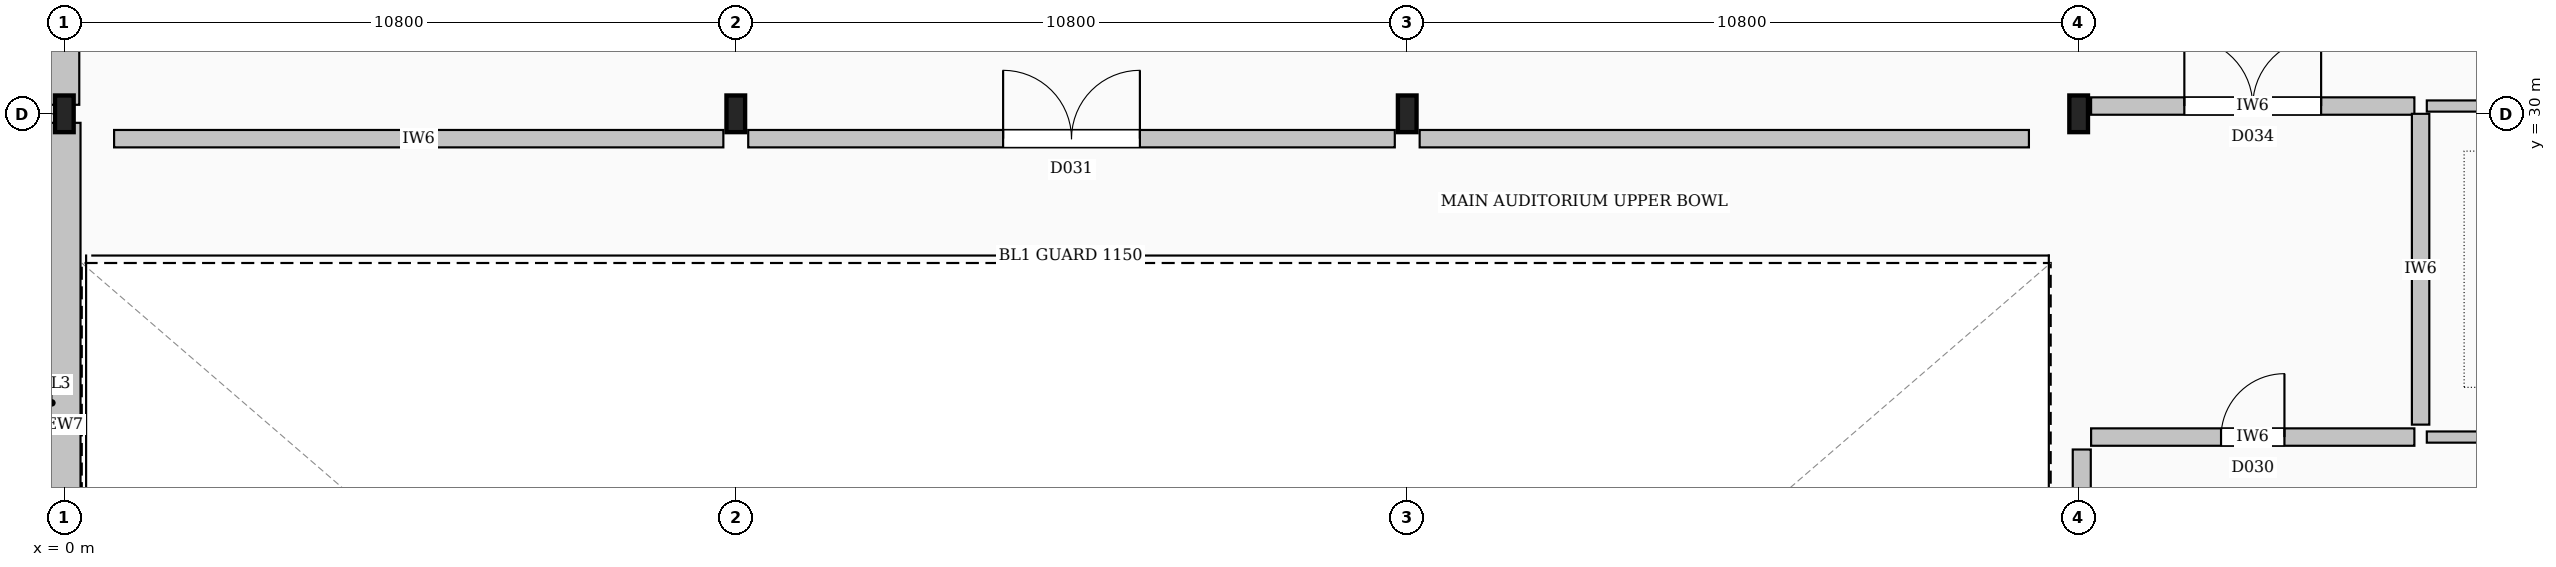
"""IFC4 building model, lengths in metres.
Left out: names, types, materials, properties, quantities, classifications, styles, units other than length and angle.
Written with IfcOpenShell. Run it as: python <this file> out.ifc"""

import sys

from ifc_helpers import new_model, si_unit, direction, frame, frame_2d, origin, origin_2d, place, context, subcontext, project, spatial, rectangle, i_section, extrude, element, fill, save


model = new_model("IFC4")
c1 = context("Model", 3, precision=1e-05, world=origin(), true_north=direction((0.0, 1.0)))
c2 = subcontext(c1, "Body", "Model", "MODEL_VIEW")
j1 = project(units=[si_unit("LENGTHUNIT", "METRE"), si_unit("PLANEANGLEUNIT", "RADIAN")], contexts=[c1])
p1 = place(None, origin())
s1 = spatial("IfcSite", under=j1, at=p1, CompositionType="ELEMENT")
p2 = place(p1, origin())
s2 = spatial("IfcBuilding", under=s1, at=p2, CompositionType="ELEMENT")
p3 = place(p2, frame((0.0, 0.0, 4.8)))
s3 = spatial("IfcBuildingStorey", under=s2, at=p3, CompositionType="ELEMENT", Elevation=4.8)
for number, where, z_axis, x_axis in (
    (1, (0.0, 30.0, 0.0), (0.0, 0.0, 1.0), (1.0, 0.0, 0.0)),
    (2, (10.8, 30.0, 0.0), (0.0, 0.0, 1.0), (1.0, 0.0, 0.0)),
    (3, (21.6, 30.0, 0.0), (0.0, 0.0, 1.0), (1.0, 0.0, 0.0)),
    (4, (32.4, 30.0, 0.0), (0.0, 0.0, 1.0), (1.0, 0.0, 0.0)),
):
    element("IfcColumn", number, at=place(p3, frame(where, z_axis=z_axis, x_axis=x_axis)), inside=s3, PredefinedType="COLUMN", context=c2, shape_type="SweptSolid", body=[
        extrude(i_section(OverallWidth=0.3, OverallDepth=0.59, WebThickness=0.013, FlangeThickness=0.025, FilletRadius=0.027, at=origin_2d()), origin(), (0.0, 0.0, 1.0), 4.8),
    ])
p4 = place(p3, frame((0.0, 39.855, 0.0), z_axis=(0.0, 0.0, 1.0), x_axis=(0.0, -1.0, 0.0)))
e5 = element("IfcWall", 5, at=p4, inside=s3, PredefinedType="STANDARD", context=c2, shape_type="SweptSolid", body=[
    extrude(rectangle(XDim=9.71, YDim=0.48, at=frame_2d((4.855, 0.0))), origin(), (0.0, 0.0, 1.0), 4.13),
])
p5 = place(p4, frame((3.255, 0.0, 1.0)))
e6 = element("IfcOpeningElement", 6, at=p5, cuts=e5, PredefinedType="OPENING", context=c2, shape_type="SweptSolid", body=[
    extrude(rectangle(XDim=3.2, YDim=2.2, at=frame_2d((1.6, 1.1))), frame((0.0, 0.25, 0.0), z_axis=(0.0, -1.0, 0.0), x_axis=(1.0, 0.0, 0.0)), (0.0, 0.0, 1.0), 0.5),
])
p6 = place(p3, frame((0.0, 29.855, 0.0), z_axis=(0.0, 0.0, 1.0), x_axis=(0.0, -1.0, 0.0)))
e7 = element("IfcWall", 7, at=p6, inside=s3, PredefinedType="SOLIDWALL", context=c2, shape_type="SweptSolid", body=[
    extrude(rectangle(XDim=9.71, YDim=0.52, at=frame_2d((4.855, 0.0))), origin(), (0.0, 0.0, 1.0), 4.359),
])
p7 = place(p3, frame((32.6, 24.8, 0.0), z_axis=(0.0, 0.0, 1.0), x_axis=(1.0, 0.0, 0.0)))
e8 = element("IfcWall", 8, at=p7, inside=s3, PredefinedType="SOLIDWALL", context=c2, shape_type="SweptSolid", body=[
    extrude(rectangle(XDim=5.2, YDim=0.28, at=frame_2d((2.6, 0.0))), origin(), (0.0, 0.0, 1.0), 4.52),
])
p8 = place(p7, frame((2.09, 0.0, 0.0)))
e9 = element("IfcOpeningElement", 9, at=p8, cuts=e8, PredefinedType="OPENING", context=c2, shape_type="SweptSolid", body=[
    extrude(rectangle(XDim=1.02, YDim=2.15, at=frame_2d((0.51, 1.075))), frame((0.0, 0.15, 0.0), z_axis=(0.0, -1.0, 0.0), x_axis=(1.0, 0.0, 0.0)), (0.0, 0.0, 1.0), 0.3),
])
p9 = place(p3, frame((0.8, 29.6, 0.0), z_axis=(0.0, 0.0, 1.0), x_axis=(1.0, 0.0, 0.0)))
e10 = element("IfcWall", 10, at=p9, inside=s3, PredefinedType="SOLIDWALL", context=c2, shape_type="SweptSolid", body=[
    extrude(rectangle(XDim=9.8, YDim=0.28, at=frame_2d((4.9, 0.0))), origin(), (0.0, 0.0, 1.0), 4.52),
])
p10 = place(p3, frame((11.0, 29.6, 0.0), z_axis=(0.0, 0.0, 1.0), x_axis=(1.0, 0.0, 0.0)))
e11 = element("IfcWall", 11, at=p10, inside=s3, PredefinedType="SOLIDWALL", context=c2, shape_type="SweptSolid", body=[
    extrude(rectangle(XDim=10.4, YDim=0.28, at=frame_2d((5.2, 0.0))), origin(), (0.0, 0.0, 1.0), 4.52),
])
p11 = place(p10, frame((4.1, 0.0, 0.0)))
e12 = element("IfcOpeningElement", 12, at=p11, cuts=e11, PredefinedType="OPENING", context=c2, shape_type="SweptSolid", body=[
    extrude(rectangle(XDim=2.2, YDim=2.5, at=frame_2d((1.1, 1.25))), frame((0.0, 0.15, 0.0), z_axis=(0.0, -1.0, 0.0), x_axis=(1.0, 0.0, 0.0)), (0.0, 0.0, 1.0), 0.3),
])
p12 = place(p3, frame((21.8, 29.6, 0.0), z_axis=(0.0, 0.0, 1.0), x_axis=(1.0, 0.0, 0.0)))
e13 = element("IfcWall", 13, at=p12, inside=s3, PredefinedType="SOLIDWALL", context=c2, shape_type="SweptSolid", body=[
    extrude(rectangle(XDim=9.8, YDim=0.28, at=frame_2d((4.9, 0.0))), origin(), (0.0, 0.0, 1.0), 4.52),
])
p13 = place(p3, frame((32.6, 30.125, 0.0), z_axis=(0.0, 0.0, 1.0), x_axis=(1.0, 0.0, 0.0)))
e14 = element("IfcWall", 14, at=p13, inside=s3, PredefinedType="SOLIDWALL", context=c2, shape_type="SweptSolid", body=[
    extrude(rectangle(XDim=5.2, YDim=0.28, at=frame_2d((2.6, 0.0))), origin(), (0.0, 0.0, 1.0), 4.059),
])
p14 = place(p13, frame((1.5, 0.0, 0.0)))
e15 = element("IfcOpeningElement", 15, at=p14, cuts=e14, PredefinedType="OPENING", context=c2, shape_type="SweptSolid", body=[
    extrude(rectangle(XDim=2.2, YDim=2.5, at=frame_2d((1.1, 1.25))), frame((0.0, 0.15, 0.0), z_axis=(0.0, -1.0, 0.0), x_axis=(1.0, 0.0, 0.0)), (0.0, 0.0, 1.0), 0.3),
])
p15 = place(p3, frame((38.0, 30.125, 0.0), z_axis=(0.0, 0.0, 1.0), x_axis=(1.0, 0.0, 0.0)))
e16 = element("IfcWall", 16, at=p15, inside=s3, PredefinedType="PLUMBINGWALL", context=c2, shape_type="SweptSolid", body=[
    extrude(rectangle(XDim=5.02, YDim=0.18, at=frame_2d((2.51, 0.0))), origin(), (0.0, 0.0, 1.0), 4.059),
])
p16 = place(p15, frame((1.885, 0.0, 0.0)))
e17 = element("IfcOpeningElement", 17, at=p16, cuts=e16, PredefinedType="OPENING", context=c2, shape_type="SweptSolid", body=[
    extrude(rectangle(XDim=1.25, YDim=2.3, at=frame_2d((0.625, 1.15))), frame((0.0, 0.1, 0.0), z_axis=(0.0, -1.0, 0.0), x_axis=(1.0, 0.0, 0.0)), (0.0, 0.0, 1.0), 0.2),
])
p17 = place(p3, frame((38.0, 24.8, 0.0), z_axis=(0.0, 0.0, 1.0), x_axis=(1.0, 0.0, 0.0)))
e18 = element("IfcWall", 18, at=p17, inside=s3, PredefinedType="PLUMBINGWALL", context=c2, shape_type="SweptSolid", body=[
    extrude(rectangle(XDim=5.02, YDim=0.18, at=frame_2d((2.51, 0.0))), origin(), (0.0, 0.0, 1.0), 4.52),
])
p18 = place(p3, frame((37.9, 25.0, 0.0), z_axis=(0.0, 0.0, 1.0), x_axis=(0.0, 1.0, 0.0)))
e19 = element("IfcWall", 19, at=p18, inside=s3, PredefinedType="SOLIDWALL", context=c2, shape_type="SweptSolid", body=[
    extrude(rectangle(XDim=5.0, YDim=0.28, at=frame_2d((2.5, 0.0))), origin(), (0.0, 0.0, 1.0), 4.52),
])
p19 = place(p3, frame((32.45, 20.2, 0.0), z_axis=(0.0, 0.0, 1.0), x_axis=(0.0, 1.0, 0.0)))
e20 = element("IfcWall", 20, at=p19, inside=s3, PredefinedType="PARTITIONING", context=c2, shape_type="SweptSolid", body=[
    extrude(rectangle(XDim=4.4, YDim=0.29, at=frame_2d((2.2, 0.0))), origin(), (0.0, 0.0, 1.0), 4.05),
])
p20 = place(p8, origin())
e21 = element("IfcDoor", 21, at=p20, inside=s3, OperationType="SINGLE_SWING_RIGHT", PredefinedType="DOOR", context=c2, shape_type="SweptSolid", body=[
    extrude(rectangle(XDim=1.02, YDim=2.15, at=frame_2d((0.51, 1.075))), frame((0.0, 0.025, 0.0), z_axis=(0.0, -1.0, 0.0), x_axis=(1.0, 0.0, 0.0)), (0.0, 0.0, 1.0), 0.05),
])
fill(e9, e21)
p21 = place(p11, origin())
e22 = element("IfcDoor", 22, at=p21, inside=s3, OperationType="DOUBLE_DOOR_SINGLE_SWING", PredefinedType="DOOR", context=c2, shape_type="SweptSolid", body=[
    extrude(rectangle(XDim=2.2, YDim=2.5, at=frame_2d((1.1, 1.25))), frame((0.0, 0.025, 0.0), z_axis=(0.0, -1.0, 0.0), x_axis=(1.0, 0.0, 0.0)), (0.0, 0.0, 1.0), 0.05),
])
fill(e12, e22)
p22 = place(p14, origin())
e23 = element("IfcDoor", 23, at=p22, inside=s3, OperationType="DOUBLE_DOOR_SINGLE_SWING", PredefinedType="DOOR", context=c2, shape_type="SweptSolid", body=[
    extrude(rectangle(XDim=2.2, YDim=2.5, at=frame_2d((1.1, 1.25))), frame((0.0, 0.025, 0.0), z_axis=(0.0, -1.0, 0.0), x_axis=(1.0, 0.0, 0.0)), (0.0, 0.0, 1.0), 0.05),
])
fill(e15, e23)
save(model, sys.argv[1])
